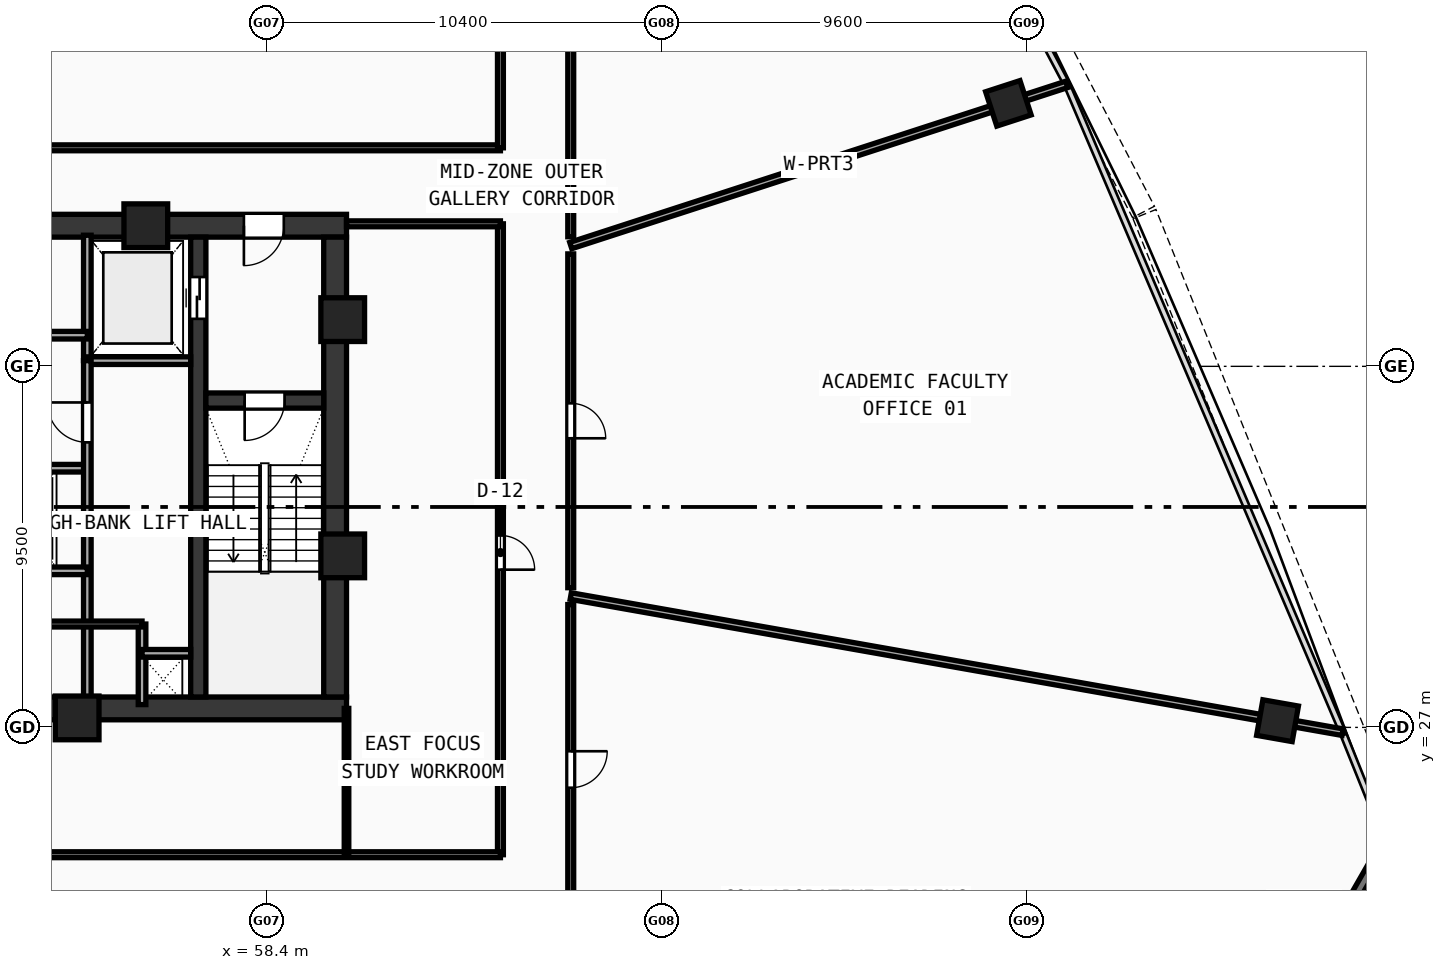
"""IFC4 building model, lengths in metres.
Left out: names, types, materials, properties, quantities, classifications, styles, units other than length and angle.
Written with IfcOpenShell. Run it as: python <this file> out.ifc"""

import sys

from ifc_helpers import new_model, si_unit, direction, frame, frame_2d, origin, origin_with_axes, origin_2d, place, context, subcontext, project, spatial, rectangle, hollow_rectangle, extrude, source, transform, mapped, element, fill, save


model = new_model("IFC4")
c1 = context("Model", 3, precision=1e-05, world=origin(), true_north=direction((0.0, 1.0)))
c2 = subcontext(c1, "Body", "Model", "MODEL_VIEW")
j1 = project(units=[si_unit("LENGTHUNIT", "METRE"), si_unit("PLANEANGLEUNIT", "RADIAN")], contexts=[c1])
p1 = place(None, origin())
s1 = spatial("IfcSite", under=j1, at=p1, CompositionType="ELEMENT")
p2 = place(p1, origin())
s2 = spatial("IfcBuilding", under=s1, at=p2, CompositionType="ELEMENT")
p3 = place(p2, frame((0.0, 0.0, 148.23)))
s3 = spatial("IfcBuildingStorey", under=s2, at=p3, CompositionType="ELEMENT", Elevation=148.23)
p4 = place(p3, frame((35.5, 27.5, 0.0), z_axis=(0.0, 0.0, 1.0), x_axis=(1.0, 0.0, 0.0)))
e1 = element("IfcWall", 1, at=p4, inside=s3, PredefinedType="SHEAR", context=c2, shape_type="SweptSolid", body=[
    extrude(rectangle(XDim=25.0, YDim=0.6, at=frame_2d((12.5, 0.0))), origin(), (0.0, 0.0, 1.0), 3.42),
])
p5 = place(p3, frame((49.2, 40.2, 0.0), z_axis=(0.0, 0.0, 1.0), x_axis=(1.0, 0.0, 0.0)))
e2 = element("IfcWall", 2, at=p5, inside=s3, PredefinedType="SHEAR", context=c2, shape_type="SweptSolid", body=[
    extrude(rectangle(XDim=11.3, YDim=0.6, at=frame_2d((5.65, 0.0))), origin(), (0.0, 0.0, 1.0), 3.42),
])
p6 = place(p5, frame((8.6, 0.0, 0.0)))
e3 = element("IfcOpeningElement", 3, at=p6, cuts=e2, PredefinedType="OPENING", context=c2, shape_type="SweptSolid", body=[
    extrude(rectangle(XDim=1.05, YDim=2.1, at=frame_2d((0.525, 1.05))), frame((0.0, 0.31, 0.0), z_axis=(0.0, -1.0, 0.0), x_axis=(1.0, 0.0, 0.0)), (0.0, 0.0, 1.0), 0.62),
])
p7 = place(p3, frame((60.2, 27.8, 0.0), z_axis=(0.0, 0.0, 1.0), x_axis=(0.0, 1.0, 0.0)))
e4 = element("IfcWall", 4, at=p7, inside=s3, PredefinedType="SHEAR", context=c2, shape_type="SweptSolid", body=[
    extrude(rectangle(XDim=12.1, YDim=0.6, at=frame_2d((6.05, 0.0))), origin(), (0.0, 0.0, 1.0), 3.42),
])
p8 = place(p3, frame((56.6, 27.8, 0.0), z_axis=(0.0, 0.0, 1.0), x_axis=(0.0, 1.0, 0.0)))
e5 = element("IfcWall", 5, at=p8, inside=s3, PredefinedType="SHEAR", context=c2, shape_type="SweptSolid", body=[
    extrude(rectangle(XDim=12.1, YDim=0.4, at=frame_2d((6.05, 0.0))), origin(), (0.0, 0.0, 1.0), 3.42),
])
p9 = place(p8, frame((9.95, 0.0, 0.0)))
e6 = element("IfcOpeningElement", 6, at=p9, cuts=e5, PredefinedType="OPENING", context=c2, shape_type="SweptSolid", body=[
    extrude(rectangle(XDim=1.1, YDim=2.1, at=frame_2d((0.55, 1.05))), frame((0.0, 0.21, 0.0), z_axis=(0.0, -1.0, 0.0), x_axis=(1.0, 0.0, 0.0)), (0.0, 0.0, 1.0), 0.42),
])
p10 = place(p3, frame((56.8, 35.6, 0.0), z_axis=(0.0, 0.0, 1.0), x_axis=(1.0, 0.0, 0.0)))
e7 = element("IfcWall", 7, at=p10, inside=s3, PredefinedType="SHEAR", context=c2, shape_type="SweptSolid", body=[
    extrude(rectangle(XDim=3.1, YDim=0.4, at=frame_2d((1.55, 0.0))), origin(), (0.0, 0.0, 1.0), 3.42),
])
p11 = place(p10, frame((1.02, 0.0, 0.0)))
e8 = element("IfcOpeningElement", 8, at=p11, cuts=e7, PredefinedType="OPENING", context=c2, shape_type="SweptSolid", body=[
    extrude(rectangle(XDim=1.05, YDim=2.1, at=frame_2d((0.525, 1.05))), frame((0.0, 0.21, 0.0), z_axis=(0.0, -1.0, 0.0), x_axis=(1.0, 0.0, 0.0)), (0.0, 0.0, 1.0), 0.42),
])
m1 = source(origin(), c2, "Body", "SweptSolid", [
    extrude(hollow_rectangle(XDim=1.15, YDim=1.15, WallThickness=0.048, at=origin_2d()), origin(), (0.0, 0.0, 1.0), 3.68),
])
for number, where, z_axis, x_axis in (
    (9, (53.412, 27.25, -0.26), (0.0, 0.0, 1.0), (1.0, 0.0, 0.0)),
    (10, (60.4, 31.513, -0.26), (0.0, 0.0, 1.0), (1.0, 0.0, 0.0)),
    (11, (60.4, 37.729, -0.26), (0.0, 0.0, 1.0), (1.0, 0.0, 0.0)),
    (12, (55.219, 40.2, -0.26), (0.0, 0.0, 1.0), (1.0, 0.0, 0.0)),
):
    element("IfcColumn", number, at=place(p3, frame(where, z_axis=z_axis, x_axis=x_axis)), inside=s3, PredefinedType="COLUMN", context=c2, shape_type="MappedRepresentation", body=[
        mapped(m1, transform((0.0, 0.0, 0.0), scale=1.0)),
    ])
m2 = source(origin(), c2, "Body", "SweptSolid", [
    extrude(hollow_rectangle(XDim=0.95, YDim=0.95, WallThickness=0.04, at=origin_2d()), origin(), (0.0, 0.0, 1.0), 3.68),
])
for number, where, z_axis, x_axis in (
    (13, (84.997, 27.177, -0.26), (0.0, 0.0, 1.0), (0.174, 0.985, 0.0)),
    (14, (77.915, 43.42, -0.26), (0.0, 0.0, 1.0), (-0.309, 0.951, 0.0)),
):
    element("IfcColumn", number, at=place(p3, frame(where, z_axis=z_axis, x_axis=x_axis)), inside=s3, PredefinedType="COLUMN", context=c2, shape_type="MappedRepresentation", body=[
        mapped(m2, transform((0.0, 0.0, 0.0), scale=1.0)),
    ])
p12 = place(p3, frame((83.488, 16.356, 0.0), z_axis=(0.0, 0.0, 1.0), x_axis=(0.497915888941, 0.867225326856, 0.0)))
e15 = element("IfcWall", 15, at=p12, inside=s3, PredefinedType="STANDARD", context=c2, shape_type="SweptSolid", body=[
    extrude(rectangle(XDim=8.858, YDim=0.26, at=frame_2d((4.429, 0.0))), origin(), (0.0, 0.0, 1.0), 3.42),
])
p13 = place(p12, frame((3.529, 0.0, 0.0)))
e16 = element("IfcOpeningElement", 16, at=p13, cuts=e15, PredefinedType="OPENING", context=c2, shape_type="SweptSolid", body=[
    extrude(rectangle(XDim=1.8, YDim=2.15, at=frame_2d((0.9, 1.075))), frame((0.0, 0.14, 0.0), z_axis=(0.0, -1.0, 0.0), x_axis=(1.0, 0.0, 0.0)), (0.0, 0.0, 1.0), 0.28),
])
p14 = place(p3, frame((53.68, 36.65, 0.0), z_axis=(0.0, 0.0, 1.0), x_axis=(0.0, 1.0, 0.0)))
e17 = element("IfcWall", 17, at=p14, inside=s3, PredefinedType="SOLIDWALL", context=c2, shape_type="SweptSolid", body=[
    extrude(rectangle(XDim=3.3, YDim=0.2, at=frame_2d((1.65, 0.0))), origin(), (0.0, 0.0, 1.0), 3.42),
])
p15 = place(p3, frame((53.68, 36.65, 0.0), z_axis=(0.0, 0.0, 1.0), x_axis=(1.0, 0.0, 0.0)))
e18 = element("IfcWall", 18, at=p15, inside=s3, PredefinedType="SOLIDWALL", context=c2, shape_type="SweptSolid", body=[
    extrude(rectangle(XDim=2.72, YDim=0.2, at=frame_2d((1.36, 0.0))), origin(), (0.0, 0.0, 1.0), 3.42),
])
p16 = place(p3, frame((48.95, 37.32, 0.0), z_axis=(0.0, 0.0, 1.0), x_axis=(1.0, 0.0, 0.0)))
e19 = element("IfcWall", 19, at=p16, inside=s3, PredefinedType="SOLIDWALL", context=c2, shape_type="SweptSolid", body=[
    extrude(rectangle(XDim=4.73, YDim=0.2, at=frame_2d((2.365, 0.0))), origin(), (0.0, 0.0, 1.0), 3.42),
])
p17 = place(p16, frame((1.8, 0.0, 0.0)))
e20 = element("IfcOpeningElement", 20, at=p17, cuts=e19, PredefinedType="OPENING", context=c2, shape_type="SweptSolid", body=[
    extrude(rectangle(XDim=0.9, YDim=2.1, at=frame_2d((0.45, 1.05))), frame((0.0, 0.11, 0.0), z_axis=(0.0, -1.0, 0.0), x_axis=(1.0, 0.0, 0.0)), (0.0, 0.0, 1.0), 0.22),
])
p18 = place(p3, frame((43.85, 33.82, 0.0), z_axis=(0.0, 0.0, 1.0), x_axis=(1.0, 0.0, 0.0)))
e21 = element("IfcWall", 21, at=p18, inside=s3, PredefinedType="SOLIDWALL", context=c2, shape_type="SweptSolid", body=[
    extrude(rectangle(XDim=9.83, YDim=0.2, at=frame_2d((4.915, 0.0))), origin(), (0.0, 0.0, 1.0), 3.42),
])
p19 = place(p18, frame((0.575, 0.0, 0.0)))
e22 = element("IfcOpeningElement", 22, at=p19, cuts=e21, PredefinedType="OPENING", context=c2, shape_type="SweptSolid", body=[
    extrude(rectangle(XDim=1.05, YDim=2.1, at=frame_2d((0.525, 1.05))), frame((0.0, 0.11, 0.0), z_axis=(0.0, -1.0, 0.0), x_axis=(1.0, 0.0, 0.0)), (0.0, 0.0, 1.0), 0.22),
])
p20 = place(p18, frame((2.875, 0.0, 0.0)))
e23 = element("IfcOpeningElement", 23, at=p20, cuts=e21, PredefinedType="OPENING", context=c2, shape_type="SweptSolid", body=[
    extrude(rectangle(XDim=1.05, YDim=2.1, at=frame_2d((0.525, 1.05))), frame((0.0, 0.11, 0.0), z_axis=(0.0, -1.0, 0.0), x_axis=(1.0, 0.0, 0.0)), (0.0, 0.0, 1.0), 0.22),
])
p21 = place(p18, frame((5.175, 0.0, 0.0)))
e24 = element("IfcOpeningElement", 24, at=p21, cuts=e21, PredefinedType="OPENING", context=c2, shape_type="SweptSolid", body=[
    extrude(rectangle(XDim=1.05, YDim=2.1, at=frame_2d((0.525, 1.05))), frame((0.0, 0.11, 0.0), z_axis=(0.0, -1.0, 0.0), x_axis=(1.0, 0.0, 0.0)), (0.0, 0.0, 1.0), 0.22),
])
p22 = place(p18, frame((7.475, 0.0, 0.0)))
e25 = element("IfcOpeningElement", 25, at=p22, cuts=e21, PredefinedType="OPENING", context=c2, shape_type="SweptSolid", body=[
    extrude(rectangle(XDim=1.05, YDim=2.1, at=frame_2d((0.525, 1.05))), frame((0.0, 0.11, 0.0), z_axis=(0.0, -1.0, 0.0), x_axis=(1.0, 0.0, 0.0)), (0.0, 0.0, 1.0), 0.22),
])
p23 = place(p3, frame((53.68, 27.6, 0.0), z_axis=(0.0, 0.0, 1.0), x_axis=(0.0, 1.0, 0.0)))
e26 = element("IfcWall", 26, at=p23, inside=s3, PredefinedType="SOLIDWALL", context=c2, shape_type="SweptSolid", body=[
    extrude(rectangle(XDim=9.05, YDim=0.2, at=frame_2d((4.525, 0.0))), origin(), (0.0, 0.0, 1.0), 3.42),
])
p24 = place(p23, frame((6.9, 0.0, 0.0)))
e27 = element("IfcOpeningElement", 27, at=p24, cuts=e26, PredefinedType="OPENING", context=c2, shape_type="SweptSolid", body=[
    extrude(rectangle(XDim=1.05, YDim=2.1, at=frame_2d((0.525, 1.05))), frame((0.0, 0.11, 0.0), z_axis=(0.0, -1.0, 0.0), x_axis=(1.0, 0.0, 0.0)), (0.0, 0.0, 1.0), 0.22),
])
p25 = place(p3, frame((43.85, 31.12, 0.0), z_axis=(0.0, 0.0, 1.0), x_axis=(1.0, 0.0, 0.0)))
e28 = element("IfcWall", 28, at=p25, inside=s3, PredefinedType="SOLIDWALL", context=c2, shape_type="SweptSolid", body=[
    extrude(rectangle(XDim=9.83, YDim=0.2, at=frame_2d((4.915, 0.0))), origin(), (0.0, 0.0, 1.0), 3.42),
])
p26 = place(p3, frame((55.12, 27.6, 0.0), z_axis=(0.0, 0.0, 1.0), x_axis=(0.0, 1.0, 0.0)))
e29 = element("IfcWall", 29, at=p26, inside=s3, PredefinedType="SOLIDWALL", context=c2, shape_type="SweptSolid", body=[
    extrude(rectangle(XDim=2.12, YDim=0.2, at=frame_2d((1.06, 0.0))), origin(), (0.0, 0.0, 1.0), 3.42),
])
p27 = place(p3, frame((55.12, 28.95, 0.0), z_axis=(0.0, 0.0, 1.0), x_axis=(1.0, 0.0, 0.0)))
e30 = element("IfcWall", 30, at=p27, inside=s3, PredefinedType="SOLIDWALL", context=c2, shape_type="SweptSolid", body=[
    extrude(rectangle(XDim=1.28, YDim=0.2, at=frame_2d((0.64, 0.0))), origin(), (0.0, 0.0, 1.0), 3.42),
])
p28 = place(p3, frame((51.05, 29.72, 0.0), z_axis=(0.0, 0.0, 1.0), x_axis=(1.0, 0.0, 0.0)))
e31 = element("IfcWall", 31, at=p28, inside=s3, PredefinedType="PARTITIONING", context=c2, shape_type="SweptSolid", body=[
    extrude(rectangle(XDim=4.07, YDim=0.155, at=frame_2d((2.035, 0.0))), origin(), (0.0, 0.0, 1.0), 3.42),
])
p29 = place(p28, frame((0.5, 0.0, 0.0)))
e32 = element("IfcOpeningElement", 32, at=p29, cuts=e31, PredefinedType="OPENING", context=c2, shape_type="SweptSolid", body=[
    extrude(rectangle(XDim=0.9, YDim=2.1, at=frame_2d((0.45, 1.05))), frame((0.0, 0.087, 0.0), z_axis=(0.0, -1.0, 0.0), x_axis=(1.0, 0.0, 0.0)), (0.0, 0.0, 1.0), 0.175),
])
p30 = place(p3, frame((31.45, 42.25, 0.0), z_axis=(0.0, 0.0, 1.0), x_axis=(1.0, 0.0, 0.0)))
e33 = element("IfcWall", 33, at=p30, inside=s3, PredefinedType="PARTITIONING", context=c2, shape_type="SweptSolid", body=[
    extrude(rectangle(XDim=33.1, YDim=0.155, at=frame_2d((16.55, 0.0))), origin(), (0.0, 0.0, 1.0), 2.77),
])
p31 = place(p3, frame((64.55, 42.25, 0.0), z_axis=(0.0, 0.0, 1.0), x_axis=(0.0, 1.0, 0.0)))
e34 = element("IfcWall", 34, at=p31, inside=s3, PredefinedType="PARTITIONING", context=c2, shape_type="SweptSolid", body=[
    extrude(rectangle(XDim=11.7, YDim=0.155, at=frame_2d((5.85, 0.0))), origin(), (0.0, 0.0, 1.0), 2.77),
])
p32 = place(p3, frame((64.55, 23.65, 0.0), z_axis=(0.0, 0.0, 1.0), x_axis=(0.0, 1.0, 0.0)))
e35 = element("IfcWall", 35, at=p32, inside=s3, PredefinedType="PARTITIONING", context=c2, shape_type="SweptSolid", body=[
    extrude(rectangle(XDim=16.6, YDim=0.155, at=frame_2d((8.3, 0.0))), origin(), (0.0, 0.0, 1.0), 2.77),
])
p33 = place(p32, frame((7.5, 0.0, 0.0)))
e36 = element("IfcOpeningElement", 36, at=p33, cuts=e35, PredefinedType="OPENING", context=c2, shape_type="SweptSolid", body=[
    extrude(rectangle(XDim=0.9, YDim=2.08, at=frame_2d((0.45, 1.04))), frame((0.0, 0.087, 0.0), z_axis=(0.0, -1.0, 0.0), x_axis=(1.0, 0.0, 0.0)), (0.0, 0.0, 1.0), 0.175),
])
p34 = place(p3, frame((31.45, 23.65, 0.0), z_axis=(0.0, 0.0, 1.0), x_axis=(1.0, 0.0, 0.0)))
e37 = element("IfcWall", 37, at=p34, inside=s3, PredefinedType="PARTITIONING", context=c2, shape_type="SweptSolid", body=[
    extrude(rectangle(XDim=33.1, YDim=0.155, at=frame_2d((16.55, 0.0))), origin(), (0.0, 0.0, 1.0), 2.77),
])
p35 = place(p34, frame((16.0, 0.0, 0.0)))
e38 = element("IfcOpeningElement", 38, at=p35, cuts=e37, PredefinedType="OPENING", context=c2, shape_type="SweptSolid", body=[
    extrude(rectangle(XDim=0.92, YDim=2.1, at=frame_2d((0.46, 1.05))), frame((0.0, 0.087, 0.0), z_axis=(0.0, -1.0, 0.0), x_axis=(1.0, 0.0, 0.0)), (0.0, 0.0, 1.0), 0.175),
])
p36 = place(p3, frame((60.5, 40.25, 0.0), z_axis=(0.0, 0.0, 1.0), x_axis=(1.0, 0.0, 0.0)))
e39 = element("IfcWall", 39, at=p36, inside=s3, PredefinedType="PARTITIONING", context=c2, shape_type="SweptSolid", body=[
    extrude(rectangle(XDim=4.05, YDim=0.155, at=frame_2d((2.025, 0.0))), origin(), (0.0, 0.0, 1.0), 3.42),
])
p37 = place(p3, frame((60.5, 23.65, 0.0), z_axis=(0.0, 0.0, 1.0), x_axis=(0.0, 1.0, 0.0)))
e40 = element("IfcWall", 40, at=p37, inside=s3, PredefinedType="PARTITIONING", context=c2, shape_type="SweptSolid", body=[
    extrude(rectangle(XDim=3.85, YDim=0.12, at=frame_2d((1.925, 0.0))), origin(), (0.0, 0.0, 1.0), 3.02),
])
p38 = place(p3, frame((66.4, 39.678, 0.0), z_axis=(0.0, 0.0, 1.0), x_axis=(0.951057598357, 0.309013664112, 0.0)))
e41 = element("IfcWall", 41, at=p38, inside=s3, PredefinedType="PARTITIONING", context=c2, shape_type="SweptSolid", body=[
    extrude(rectangle(XDim=13.723, YDim=0.175, at=frame_2d((6.862, 0.0))), origin(), (0.0, 0.0, 1.0), 2.77),
])
p39 = place(p3, frame((66.4, 30.456, 0.0), z_axis=(0.0, 0.0, 1.0), x_axis=(0.984807623882, -0.173648909998, 0.0)))
e42 = element("IfcWall", 42, at=p39, inside=s3, PredefinedType="PARTITIONING", context=c2, shape_type="SweptSolid", body=[
    extrude(rectangle(XDim=20.622, YDim=0.175, at=frame_2d((10.311, 0.0))), origin(), (0.0, 0.0, 1.0), 2.77),
])
p40 = place(p3, frame((66.4, 55.408, 0.0), z_axis=(0.0, 0.0, 1.0), x_axis=(0.0, -1.0, 0.0)))
e43 = element("IfcWall", 43, at=p40, inside=s3, PredefinedType="PARTITIONING", context=c2, shape_type="SweptSolid", body=[
    extrude(rectangle(XDim=15.499, YDim=0.155, at=frame_2d((7.749, 0.0))), origin(), (0.0, 0.0, 1.0), 2.77),
])
p41 = place(p40, frame((7.28, 0.0, 0.0)))
e44 = element("IfcOpeningElement", 44, at=p41, cuts=e43, PredefinedType="OPENING", context=c2, shape_type="SweptSolid", body=[
    extrude(rectangle(XDim=0.96, YDim=2.12, at=frame_2d((0.48, 1.06))), frame((0.0, 0.087, 0.0), z_axis=(0.0, -1.0, 0.0), x_axis=(1.0, 0.0, 0.0)), (0.0, 0.0, 1.0), 0.175),
])
p42 = place(p3, frame((66.4, 39.459, 0.0), z_axis=(0.0, 0.0, 1.0), x_axis=(0.0, -1.0, 0.0)))
e45 = element("IfcWall", 45, at=p42, inside=s3, PredefinedType="PARTITIONING", context=c2, shape_type="SweptSolid", body=[
    extrude(rectangle(XDim=8.783, YDim=0.155, at=frame_2d((4.392, 0.0))), origin(), (0.0, 0.0, 1.0), 3.42),
])
p43 = place(p42, frame((3.932, 0.0, 0.0)))
e46 = element("IfcOpeningElement", 46, at=p43, cuts=e45, PredefinedType="OPENING", context=c2, shape_type="SweptSolid", body=[
    extrude(rectangle(XDim=0.92, YDim=2.1, at=frame_2d((0.46, 1.05))), frame((0.0, 0.087, 0.0), z_axis=(0.0, -1.0, 0.0), x_axis=(1.0, 0.0, 0.0)), (0.0, 0.0, 1.0), 0.175),
])
p44 = place(p3, frame((66.4, 30.232, 0.0), z_axis=(0.0, 0.0, 1.0), x_axis=(0.0, -1.0, 0.0)))
e47 = element("IfcWall", 47, at=p44, inside=s3, PredefinedType="PARTITIONING", context=c2, shape_type="SweptSolid", body=[
    extrude(rectangle(XDim=8.432, YDim=0.155, at=frame_2d((4.216, 0.0))), origin(), (0.0, 0.0, 1.0), 3.02),
])
p45 = place(p44, frame((3.859, 0.0, 0.0)))
e48 = element("IfcOpeningElement", 48, at=p45, cuts=e47, PredefinedType="OPENING", context=c2, shape_type="SweptSolid", body=[
    extrude(rectangle(XDim=0.96, YDim=2.12, at=frame_2d((0.48, 1.06))), frame((0.0, 0.087, 0.0), z_axis=(0.0, -1.0, 0.0), x_axis=(1.0, 0.0, 0.0)), (0.0, 0.0, 1.0), 0.175),
])
m3 = source(origin(), c2, "Body", "SweptSolid", [
    extrude(rectangle(XDim=1.05, YDim=2.1, at=frame_2d((0.525, 1.05))), frame((0.0, 0.025, 0.0), z_axis=(0.0, -1.0, 0.0), x_axis=(1.0, 0.0, 0.0)), (0.0, 0.0, 1.0), 0.05),
])
p46 = place(p11, frame((1.05, 0.0, 0.0), z_axis=(0.0, 0.0, 1.0), x_axis=(-1.0, 0.0, 0.0)))
e49 = element("IfcDoor", 49, at=p46, inside=s3, OperationType="SINGLE_SWING_RIGHT", PredefinedType="DOOR", context=c2, shape_type="MappedRepresentation", body=[
    mapped(m3, transform((0.0, 0.0, 0.0), scale=1.0)),
])
fill(e8, e49)
p47 = place(p6, frame((1.05, 0.0, 0.0), z_axis=(0.0, 0.0, 1.0), x_axis=(-1.0, 0.0, 0.0)))
e50 = element("IfcDoor", 50, at=p47, inside=s3, OperationType="SINGLE_SWING_RIGHT", PredefinedType="DOOR", context=c2, shape_type="MappedRepresentation", body=[
    mapped(m3, transform((0.0, 0.0, 0.0), scale=1.0)),
])
fill(e3, e50)
m4 = source(origin(), c2, "Body", "SweptSolid", [
    extrude(rectangle(XDim=1.1, YDim=2.1, at=frame_2d((0.55, 1.05))), frame((0.0, 0.025, 0.0), z_axis=(0.0, -1.0, 0.0), x_axis=(1.0, 0.0, 0.0)), (0.0, 0.0, 1.0), 0.05),
])
p48 = place(p9, origin_with_axes())
e51 = element("IfcDoor", 51, at=p48, inside=s3, OperationType="DOUBLE_DOOR_SLIDING", PredefinedType="DOOR", context=c2, shape_type="MappedRepresentation", body=[
    mapped(m4, transform((0.0, 0.0, 0.0), scale=1.0)),
])
fill(e6, e51)
p49 = place(p24, origin_with_axes())
e52 = element("IfcDoor", 52, at=p49, inside=s3, OperationType="SINGLE_SWING_RIGHT", PredefinedType="DOOR", context=c2, shape_type="MappedRepresentation", body=[
    mapped(m3, transform((0.0, 0.0, 0.0), scale=1.0)),
])
fill(e27, e52)
m5 = source(origin(), c2, "Body", "SweptSolid", [
    extrude(rectangle(XDim=0.9, YDim=2.08, at=frame_2d((0.45, 1.04))), frame((0.0, 0.025, 0.0), z_axis=(0.0, -1.0, 0.0), x_axis=(1.0, 0.0, 0.0)), (0.0, 0.0, 1.0), 0.05),
])
p50 = place(p33, frame((0.9, 0.0, 0.0), z_axis=(0.0, 0.0, 1.0), x_axis=(-1.0, 0.0, 0.0)))
e53 = element("IfcDoor", 53, at=p50, inside=s3, OperationType="SINGLE_SWING_RIGHT", PredefinedType="DOOR", context=c2, shape_type="MappedRepresentation", body=[
    mapped(m5, transform((0.0, 0.0, 0.0), scale=1.0)),
])
fill(e36, e53)
m6 = source(origin(), c2, "Body", "SweptSolid", [
    extrude(rectangle(XDim=0.92, YDim=2.1, at=frame_2d((0.46, 1.05))), frame((0.0, 0.025, 0.0), z_axis=(0.0, -1.0, 0.0), x_axis=(1.0, 0.0, 0.0)), (0.0, 0.0, 1.0), 0.05),
])
p51 = place(p43, origin_with_axes())
e54 = element("IfcDoor", 54, at=p51, inside=s3, OperationType="SINGLE_SWING_RIGHT", PredefinedType="DOOR", context=c2, shape_type="MappedRepresentation", body=[
    mapped(m6, transform((0.0, 0.0, 0.0), scale=1.0)),
])
fill(e46, e54)
m7 = source(origin(), c2, "Body", "SweptSolid", [
    extrude(rectangle(XDim=0.96, YDim=2.12, at=frame_2d((0.48, 1.06))), frame((0.0, 0.025, 0.0), z_axis=(0.0, -1.0, 0.0), x_axis=(1.0, 0.0, 0.0)), (0.0, 0.0, 1.0), 0.05),
])
p52 = place(p45, origin_with_axes())
e55 = element("IfcDoor", 55, at=p52, inside=s3, OperationType="SINGLE_SWING_LEFT", PredefinedType="DOOR", context=c2, shape_type="MappedRepresentation", body=[
    mapped(m7, transform((0.0, 0.0, 0.0), scale=1.0)),
])
fill(e48, e55)
save(model, sys.argv[1])
